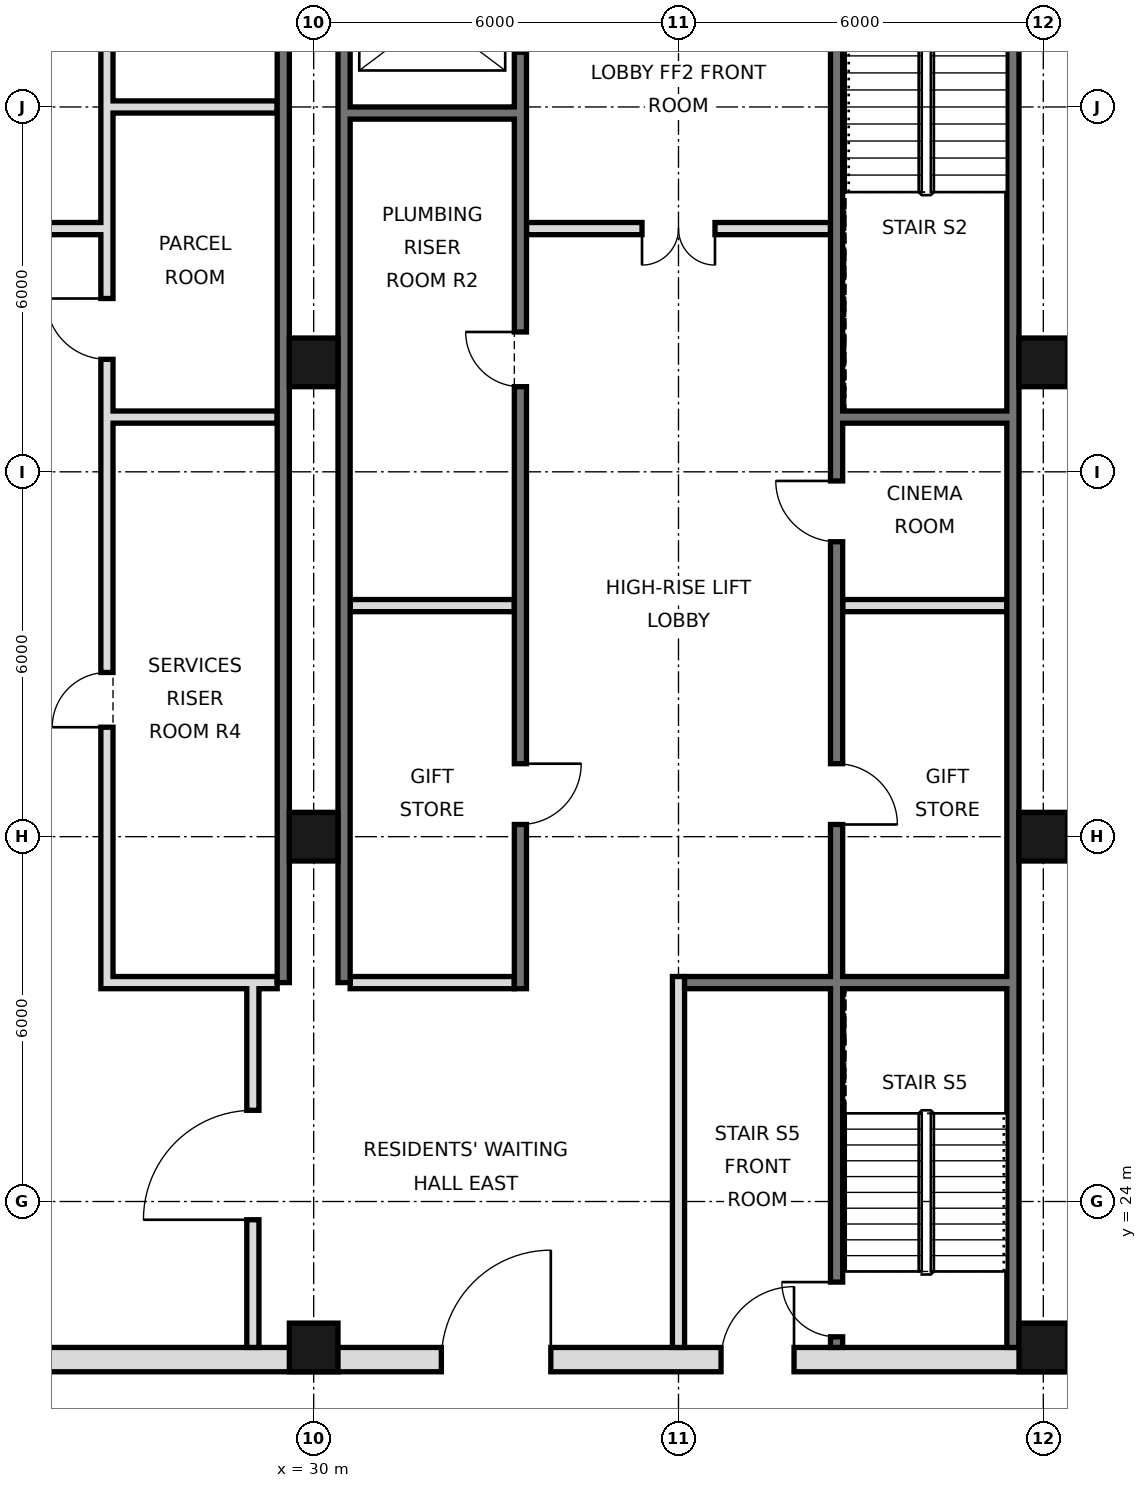
"""IFC4 building model, lengths in metres.
Left out: names, types, materials, properties, quantities, classifications, styles, units other than length and angle.
Written with IfcOpenShell. Run it as: python <this file> out.ifc"""

import sys

from ifc_helpers import new_model, si_unit, direction, frame, frame_2d, origin, origin_2d, place, context, subcontext, project, spatial, rectangle, hollow_rectangle, extrude, element, fill, save


model = new_model("IFC4")
c1 = context("Model", 3, precision=1e-05, world=origin(), true_north=direction((0.0, 1.0)))
c2 = subcontext(c1, "Body", "Model", "MODEL_VIEW")
j1 = project(units=[si_unit("LENGTHUNIT", "METRE"), si_unit("PLANEANGLEUNIT", "RADIAN")], contexts=[c1])
p1 = place(None, origin())
s1 = spatial("IfcSite", under=j1, at=p1, CompositionType="ELEMENT")
p2 = place(p1, origin())
s2 = spatial("IfcBuilding", under=s1, at=p2, CompositionType="ELEMENT")
p3 = place(p2, frame((0.0, 0.0, 96.2)))
s3 = spatial("IfcBuildingStorey", under=s2, at=p3, CompositionType="ELEMENT", Elevation=96.2)
for number, where, z_axis, x_axis in (
    (1, (30.0, 21.6, 0.0), (0.0, 0.0, 1.0), (1.0, 0.0, 0.0)),
    (2, (30.0, 30.0, 0.0), (0.0, 0.0, 1.0), (1.0, 0.0, 0.0)),
    (3, (30.0, 37.8, 0.0), (0.0, 0.0, 1.0), (1.0, 0.0, 0.0)),
    (4, (42.0, 21.6, 0.0), (0.0, 0.0, 1.0), (1.0, 0.0, 0.0)),
    (5, (42.0, 30.0, 0.0), (0.0, 0.0, 1.0), (1.0, 0.0, 0.0)),
    (6, (42.0, 37.8, 0.0), (0.0, 0.0, 1.0), (1.0, 0.0, 0.0)),
):
    element("IfcColumn", number, at=place(p3, frame(where, z_axis=z_axis, x_axis=x_axis)), inside=s3, PredefinedType="COLUMN", context=c2, shape_type="SweptSolid", body=[
        extrude(hollow_rectangle(XDim=0.8, YDim=0.8, WallThickness=0.05, at=origin_2d()), origin(), (0.0, 0.0, 1.0), 3.6),
    ])
p4 = place(p3, frame((41.5, 21.6, 0.0), z_axis=(0.0, 0.0, 1.0), x_axis=(0.0, 1.0, 0.0)))
e7 = element("IfcWall", 7, at=p4, inside=s3, PredefinedType="SOLIDWALL", context=c2, shape_type="SweptSolid", body=[
    extrude(rectangle(XDim=23.5, YDim=0.2, at=frame_2d((11.75, 0.0))), origin(), (0.0, 0.0, 1.0), 3.42),
])
for number, where, z_axis, x_axis in (
    (8, (29.5, 27.6, 0.0), (0.0, 0.0, 1.0), (0.0, 1.0, 0.0)),
    (9, (30.5, 27.6, 0.0), (0.0, 0.0, 1.0), (0.0, 1.0, 0.0)),
):
    element("IfcWall", number, at=place(p3, frame(where, z_axis=z_axis, x_axis=x_axis)), inside=s3, PredefinedType="SOLIDWALL", context=c2, shape_type="SweptSolid", body=[
        extrude(rectangle(XDim=17.5, YDim=0.2, at=frame_2d((8.75, 0.0))), origin(), (0.0, 0.0, 1.0), 3.42),
    ])
p5 = place(p3, frame((5.6, 21.4, 0.0), z_axis=(0.0, 0.0, 1.0), x_axis=(1.0, 0.0, 0.0)))
e10 = element("IfcWall", 10, at=p5, inside=s3, PredefinedType="SOLIDWALL", context=c2, shape_type="SweptSolid", body=[
    extrude(rectangle(XDim=36.8, YDim=0.4, at=frame_2d((18.4, 0.0))), origin(), (0.0, 0.0, 1.0), 3.42),
])
p6 = place(p5, frame((8.5, 0.0, 0.0)))
e11 = element("IfcOpeningElement", 11, at=p6, cuts=e10, PredefinedType="OPENING", context=c2, shape_type="SweptSolid", body=[
    extrude(rectangle(XDim=1.8, YDim=2.1, at=frame_2d((0.9, 1.05))), frame((0.0, 0.21, 0.0), z_axis=(0.0, -1.0, 0.0), x_axis=(1.0, 0.0, 0.0)), (0.0, 0.0, 1.0), 0.42),
])
p7 = place(p5, frame((17.5, 0.0, 0.0)))
e12 = element("IfcOpeningElement", 12, at=p7, cuts=e10, PredefinedType="OPENING", context=c2, shape_type="SweptSolid", body=[
    extrude(rectangle(XDim=1.8, YDim=2.1, at=frame_2d((0.9, 1.05))), frame((0.0, 0.21, 0.0), z_axis=(0.0, -1.0, 0.0), x_axis=(1.0, 0.0, 0.0)), (0.0, 0.0, 1.0), 0.42),
])
p8 = place(p5, frame((26.5, 0.0, 0.0)))
e13 = element("IfcOpeningElement", 13, at=p8, cuts=e10, PredefinedType="OPENING", context=c2, shape_type="SweptSolid", body=[
    extrude(rectangle(XDim=1.8, YDim=2.1, at=frame_2d((0.9, 1.05))), frame((0.0, 0.21, 0.0), z_axis=(0.0, -1.0, 0.0), x_axis=(1.0, 0.0, 0.0)), (0.0, 0.0, 1.0), 0.42),
])
p9 = place(p5, frame((4.5, 0.0, 0.0)))
e14 = element("IfcOpeningElement", 14, at=p9, cuts=e10, PredefinedType="OPENING", context=c2, shape_type="SweptSolid", body=[
    extrude(rectangle(XDim=1.2, YDim=2.1, at=frame_2d((0.6, 1.05))), frame((0.0, 0.21, 0.0), z_axis=(0.0, -1.0, 0.0), x_axis=(1.0, 0.0, 0.0)), (0.0, 0.0, 1.0), 0.42),
])
p10 = place(p5, frame((31.1, 0.0, 0.0)))
e15 = element("IfcOpeningElement", 15, at=p10, cuts=e10, PredefinedType="OPENING", context=c2, shape_type="SweptSolid", body=[
    extrude(rectangle(XDim=1.2, YDim=2.1, at=frame_2d((0.6, 1.05))), frame((0.0, 0.21, 0.0), z_axis=(0.0, -1.0, 0.0), x_axis=(1.0, 0.0, 0.0)), (0.0, 0.0, 1.0), 0.42),
])
p11 = place(p3, frame((29.0, 21.6, 0.0), z_axis=(0.0, 0.0, 1.0), x_axis=(0.0, 1.0, 0.0)))
e16 = element("IfcWall", 16, at=p11, inside=s3, PredefinedType="PARTITIONING", context=c2, shape_type="SweptSolid", body=[
    extrude(rectangle(XDim=6.0, YDim=0.2, at=frame_2d((3.0, 0.0))), origin(), (0.0, 0.0, 1.0), 3.42),
])
p12 = place(p11, frame((2.1, 0.0, 0.0)))
e17 = element("IfcOpeningElement", 17, at=p12, cuts=e16, PredefinedType="OPENING", context=c2, shape_type="SweptSolid", body=[
    extrude(rectangle(XDim=1.8, YDim=2.1, at=frame_2d((0.9, 1.05))), frame((0.0, 0.11, 0.0), z_axis=(0.0, -1.0, 0.0), x_axis=(1.0, 0.0, 0.0)), (0.0, 0.0, 1.0), 0.22),
])
p13 = place(p3, frame((26.6, 27.5, 0.0), z_axis=(0.0, 0.0, 1.0), x_axis=(0.0, 1.0, 0.0)))
e18 = element("IfcWall", 18, at=p13, inside=s3, PredefinedType="SOLIDWALL", context=c2, shape_type="SweptSolid", body=[
    extrude(rectangle(XDim=17.5, YDim=0.2, at=frame_2d((8.75, 0.0))), origin(), (0.0, 0.0, 1.0), 3.42),
])
p14 = place(p13, frame((4.3, 0.0, 0.0)))
e19 = element("IfcOpeningElement", 19, at=p14, cuts=e18, PredefinedType="OPENING", context=c2, shape_type="SweptSolid", body=[
    extrude(rectangle(XDim=0.9, YDim=2.1, at=frame_2d((0.45, 1.05))), frame((0.0, 0.11, 0.0), z_axis=(0.0, -1.0, 0.0), x_axis=(1.0, 0.0, 0.0)), (0.0, 0.0, 1.0), 0.22),
])
p15 = place(p13, frame((10.35, 0.0, 0.0)))
e20 = element("IfcOpeningElement", 20, at=p15, cuts=e18, PredefinedType="OPENING", context=c2, shape_type="SweptSolid", body=[
    extrude(rectangle(XDim=1.0, YDim=2.1, at=frame_2d((0.5, 1.05))), frame((0.0, 0.11, 0.0), z_axis=(0.0, -1.0, 0.0), x_axis=(1.0, 0.0, 0.0)), (0.0, 0.0, 1.0), 0.22),
])
p16 = place(p13, frame((15.475, 0.0, 0.0)))
e21 = element("IfcOpeningElement", 21, at=p16, cuts=e18, PredefinedType="OPENING", context=c2, shape_type="SweptSolid", body=[
    extrude(rectangle(XDim=1.0, YDim=2.1, at=frame_2d((0.5, 1.05))), frame((0.0, 0.11, 0.0), z_axis=(0.0, -1.0, 0.0), x_axis=(1.0, 0.0, 0.0)), (0.0, 0.0, 1.0), 0.22),
])
p17 = place(p3, frame((33.4, 27.5, 0.0), z_axis=(0.0, 0.0, 1.0), x_axis=(0.0, 1.0, 0.0)))
e22 = element("IfcWall", 22, at=p17, inside=s3, PredefinedType="SOLIDWALL", context=c2, shape_type="SweptSolid", body=[
    extrude(rectangle(XDim=17.5, YDim=0.2, at=frame_2d((8.75, 0.0))), origin(), (0.0, 0.0, 1.0), 3.42),
])
p18 = place(p17, frame((15.4, 0.0, 0.0)))
e23 = element("IfcOpeningElement", 23, at=p18, cuts=e22, PredefinedType="OPENING", context=c2, shape_type="SweptSolid", body=[
    extrude(rectangle(XDim=1.1, YDim=2.1, at=frame_2d((0.55, 1.05))), frame((0.0, 0.11, 0.0), z_axis=(0.0, -1.0, 0.0), x_axis=(1.0, 0.0, 0.0)), (0.0, 0.0, 1.0), 0.22),
])
p19 = place(p17, frame((2.7, 0.0, 0.0)))
e24 = element("IfcOpeningElement", 24, at=p19, cuts=e22, PredefinedType="OPENING", context=c2, shape_type="SweptSolid", body=[
    extrude(rectangle(XDim=1.0, YDim=2.1, at=frame_2d((0.5, 1.05))), frame((0.0, 0.11, 0.0), z_axis=(0.0, -1.0, 0.0), x_axis=(1.0, 0.0, 0.0)), (0.0, 0.0, 1.0), 0.22),
])
p20 = place(p17, frame((9.9, 0.0, 0.0)))
e25 = element("IfcOpeningElement", 25, at=p20, cuts=e22, PredefinedType="OPENING", context=c2, shape_type="SweptSolid", body=[
    extrude(rectangle(XDim=0.9, YDim=2.1, at=frame_2d((0.45, 1.05))), frame((0.0, 0.11, 0.0), z_axis=(0.0, -1.0, 0.0), x_axis=(1.0, 0.0, 0.0)), (0.0, 0.0, 1.0), 0.22),
])
p21 = place(p3, frame((36.0, 21.6, 0.0), z_axis=(0.0, 0.0, 1.0), x_axis=(0.0, 1.0, 0.0)))
e26 = element("IfcWall", 26, at=p21, inside=s3, PredefinedType="PARTITIONING", context=c2, shape_type="SweptSolid", body=[
    extrude(rectangle(XDim=6.1, YDim=0.2, at=frame_2d((3.05, 0.0))), origin(), (0.0, 0.0, 1.0), 3.42),
])
p22 = place(p3, frame((38.6, 21.6, 0.0), z_axis=(0.0, 0.0, 1.0), x_axis=(0.0, 1.0, 0.0)))
e27 = element("IfcWall", 27, at=p22, inside=s3, PredefinedType="SOLIDWALL", context=c2, shape_type="SweptSolid", body=[
    extrude(rectangle(XDim=23.4, YDim=0.2, at=frame_2d((11.7, 0.0))), origin(), (0.0, 0.0, 1.0), 3.42),
])
p23 = place(p22, frame((8.6, 0.0, 0.0)))
e28 = element("IfcOpeningElement", 28, at=p23, cuts=e27, PredefinedType="OPENING", context=c2, shape_type="SweptSolid", body=[
    extrude(rectangle(XDim=1.0, YDim=2.1, at=frame_2d((0.5, 1.05))), frame((0.0, 0.11, 0.0), z_axis=(0.0, -1.0, 0.0), x_axis=(1.0, 0.0, 0.0)), (0.0, 0.0, 1.0), 0.22),
])
p24 = place(p22, frame((13.25, 0.0, 0.0)))
e29 = element("IfcOpeningElement", 29, at=p24, cuts=e27, PredefinedType="OPENING", context=c2, shape_type="SweptSolid", body=[
    extrude(rectangle(XDim=1.0, YDim=2.1, at=frame_2d((0.5, 1.05))), frame((0.0, 0.11, 0.0), z_axis=(0.0, -1.0, 0.0), x_axis=(1.0, 0.0, 0.0)), (0.0, 0.0, 1.0), 0.22),
])
p25 = place(p22, frame((22.1, 0.0, 0.0)))
e30 = element("IfcOpeningElement", 30, at=p25, cuts=e27, PredefinedType="OPENING", context=c2, shape_type="SweptSolid", body=[
    extrude(rectangle(XDim=1.0, YDim=2.1, at=frame_2d((0.5, 1.05))), frame((0.0, 0.11, 0.0), z_axis=(0.0, -1.0, 0.0), x_axis=(1.0, 0.0, 0.0)), (0.0, 0.0, 1.0), 0.22),
])
p26 = place(p22, frame((0.175, 0.0, 0.0)))
e31 = element("IfcOpeningElement", 31, at=p26, cuts=e27, PredefinedType="OPENING", context=c2, shape_type="SweptSolid", body=[
    extrude(rectangle(XDim=0.9, YDim=2.1, at=frame_2d((0.45, 1.05))), frame((0.0, 0.11, 0.0), z_axis=(0.0, -1.0, 0.0), x_axis=(1.0, 0.0, 0.0)), (0.0, 0.0, 1.0), 0.22),
])
p27 = place(p3, frame((26.7, 27.6, 0.0), z_axis=(0.0, 0.0, 1.0), x_axis=(1.0, 0.0, 0.0)))
e32 = element("IfcWall", 32, at=p27, inside=s3, PredefinedType="SOLIDWALL", context=c2, shape_type="SweptSolid", body=[
    extrude(rectangle(XDim=2.7, YDim=0.2, at=frame_2d((1.35, 0.0))), origin(), (0.0, 0.0, 1.0), 3.42),
])
p28 = place(p3, frame((30.6, 27.6, 0.0), z_axis=(0.0, 0.0, 1.0), x_axis=(1.0, 0.0, 0.0)))
e33 = element("IfcWall", 33, at=p28, inside=s3, PredefinedType="PARTITIONING", context=c2, shape_type="SweptSolid", body=[
    extrude(rectangle(XDim=2.7, YDim=0.2, at=frame_2d((1.35, 0.0))), origin(), (0.0, 0.0, 1.0), 3.42),
])
p29 = place(p3, frame((36.1, 27.6, 0.0), z_axis=(0.0, 0.0, 1.0), x_axis=(1.0, 0.0, 0.0)))
e34 = element("IfcWall", 34, at=p29, inside=s3, PredefinedType="SOLIDWALL", context=c2, shape_type="SweptSolid", body=[
    extrude(rectangle(XDim=5.3, YDim=0.2, at=frame_2d((2.65, 0.0))), origin(), (0.0, 0.0, 1.0), 3.42),
])
p30 = place(p3, frame((30.6, 33.8, 0.0), z_axis=(0.0, 0.0, 1.0), x_axis=(1.0, 0.0, 0.0)))
e35 = element("IfcWall", 35, at=p30, inside=s3, PredefinedType="SOLIDWALL", context=c2, shape_type="SweptSolid", body=[
    extrude(rectangle(XDim=2.7, YDim=0.2, at=frame_2d((1.35, 0.0))), origin(), (0.0, 0.0, 1.0), 3.42),
])
p31 = place(p3, frame((38.7, 33.8, 0.0), z_axis=(0.0, 0.0, 1.0), x_axis=(1.0, 0.0, 0.0)))
e36 = element("IfcWall", 36, at=p31, inside=s3, PredefinedType="PARTITIONING", context=c2, shape_type="SweptSolid", body=[
    extrude(rectangle(XDim=2.7, YDim=0.2, at=frame_2d((1.35, 0.0))), origin(), (0.0, 0.0, 1.0), 3.42),
])
for number, where, z_axis, x_axis in (
    (37, (26.7, 36.9, 0.0), (0.0, 0.0, 1.0), (1.0, 0.0, 0.0)),
    (38, (38.7, 36.9, 0.0), (0.0, 0.0, 1.0), (1.0, 0.0, 0.0)),
):
    element("IfcWall", number, at=place(p3, frame(where, z_axis=z_axis, x_axis=x_axis)), inside=s3, PredefinedType="SOLIDWALL", context=c2, shape_type="SweptSolid", body=[
        extrude(rectangle(XDim=2.7, YDim=0.2, at=frame_2d((1.35, 0.0))), origin(), (0.0, 0.0, 1.0), 3.42),
    ])
p32 = place(p3, frame((21.5, 40.0, 0.0), z_axis=(0.0, 0.0, 1.0), x_axis=(1.0, 0.0, 0.0)))
e39 = element("IfcWall", 39, at=p32, inside=s3, PredefinedType="PARTITIONING", context=c2, shape_type="SweptSolid", body=[
    extrude(rectangle(XDim=5.0, YDim=0.2, at=frame_2d((2.5, 0.0))), origin(), (0.0, 0.0, 1.0), 3.42),
])
p33 = place(p32, frame((1.9, 0.0, 0.0)))
e40 = element("IfcOpeningElement", 40, at=p33, cuts=e39, PredefinedType="OPENING", context=c2, shape_type="SweptSolid", body=[
    extrude(rectangle(XDim=1.2, YDim=2.1, at=frame_2d((0.6, 1.05))), frame((0.0, 0.11, 0.0), z_axis=(0.0, -1.0, 0.0), x_axis=(1.0, 0.0, 0.0)), (0.0, 0.0, 1.0), 0.22),
])
p34 = place(p3, frame((33.5, 40.0, 0.0), z_axis=(0.0, 0.0, 1.0), x_axis=(1.0, 0.0, 0.0)))
e41 = element("IfcWall", 41, at=p34, inside=s3, PredefinedType="PARTITIONING", context=c2, shape_type="SweptSolid", body=[
    extrude(rectangle(XDim=5.0, YDim=0.2, at=frame_2d((2.5, 0.0))), origin(), (0.0, 0.0, 1.0), 3.42),
])
p35 = place(p34, frame((1.9, 0.0, 0.0)))
e42 = element("IfcOpeningElement", 42, at=p35, cuts=e41, PredefinedType="OPENING", context=c2, shape_type="SweptSolid", body=[
    extrude(rectangle(XDim=1.2, YDim=2.1, at=frame_2d((0.6, 1.05))), frame((0.0, 0.11, 0.0), z_axis=(0.0, -1.0, 0.0), x_axis=(1.0, 0.0, 0.0)), (0.0, 0.0, 1.0), 0.22),
])
p36 = place(p3, frame((30.6, 41.9, 0.0), z_axis=(0.0, 0.0, 1.0), x_axis=(1.0, 0.0, 0.0)))
e43 = element("IfcWall", 43, at=p36, inside=s3, PredefinedType="SOLIDWALL", context=c2, shape_type="SweptSolid", body=[
    extrude(rectangle(XDim=2.7, YDim=0.2, at=frame_2d((1.35, 0.0))), origin(), (0.0, 0.0, 1.0), 3.42),
])
p37 = place(p3, frame((26.7, 42.0, 0.0), z_axis=(0.0, 0.0, 1.0), x_axis=(1.0, 0.0, 0.0)))
e44 = element("IfcWall", 44, at=p37, inside=s3, PredefinedType="PARTITIONING", context=c2, shape_type="SweptSolid", body=[
    extrude(rectangle(XDim=2.7, YDim=0.2, at=frame_2d((1.35, 0.0))), origin(), (0.0, 0.0, 1.0), 3.42),
])
p38 = place(p12, origin())
e45 = element("IfcDoor", 45, at=p38, inside=s3, OperationType="SINGLE_SWING_LEFT", PredefinedType="DOOR", context=c2, shape_type="SweptSolid", body=[
    extrude(rectangle(XDim=1.8, YDim=2.1, at=frame_2d((0.9, 1.05))), frame((0.0, 0.025, 0.0), z_axis=(0.0, -1.0, 0.0), x_axis=(1.0, 0.0, 0.0)), (0.0, 0.0, 1.0), 0.05),
])
fill(e17, e45)
p39 = place(p8, frame((1.8, 0.0, 0.0), z_axis=(0.0, 0.0, 1.0), x_axis=(-1.0, 0.0, 0.0)))
e46 = element("IfcDoor", 46, at=p39, inside=s3, OperationType="SINGLE_SWING_LEFT", PredefinedType="DOOR", context=c2, shape_type="SweptSolid", body=[
    extrude(rectangle(XDim=1.8, YDim=2.1, at=frame_2d((0.9, 1.05))), frame((0.0, 0.025, 0.0), z_axis=(0.0, -1.0, 0.0), x_axis=(1.0, 0.0, 0.0)), (0.0, 0.0, 1.0), 0.05),
])
fill(e13, e46)
p40 = place(p10, frame((1.2, 0.0, 0.0), z_axis=(0.0, 0.0, 1.0), x_axis=(-1.0, 0.0, 0.0)))
e47 = element("IfcDoor", 47, at=p40, inside=s3, OperationType="SINGLE_SWING_LEFT", PredefinedType="DOOR", context=c2, shape_type="SweptSolid", body=[
    extrude(rectangle(XDim=1.2, YDim=2.1, at=frame_2d((0.6, 1.05))), frame((0.0, 0.025, 0.0), z_axis=(0.0, -1.0, 0.0), x_axis=(1.0, 0.0, 0.0)), (0.0, 0.0, 1.0), 0.05),
])
fill(e15, e47)
p41 = place(p35, frame((1.2, 0.0, 0.0), z_axis=(0.0, 0.0, 1.0), x_axis=(-1.0, 0.0, 0.0)))
e48 = element("IfcDoor", 48, at=p41, inside=s3, OperationType="DOUBLE_DOOR_SINGLE_SWING", PredefinedType="DOOR", context=c2, shape_type="SweptSolid", body=[
    extrude(rectangle(XDim=1.2, YDim=2.1, at=frame_2d((0.6, 1.05))), frame((0.0, 0.025, 0.0), z_axis=(0.0, -1.0, 0.0), x_axis=(1.0, 0.0, 0.0)), (0.0, 0.0, 1.0), 0.05),
])
fill(e42, e48)
p42 = place(p23, frame((1.0, 0.0, 0.0), z_axis=(0.0, 0.0, 1.0), x_axis=(-1.0, 0.0, 0.0)))
e49 = element("IfcDoor", 49, at=p42, inside=s3, OperationType="SINGLE_SWING_RIGHT", PredefinedType="DOOR", context=c2, shape_type="SweptSolid", body=[
    extrude(rectangle(XDim=1.0, YDim=2.1, at=frame_2d((0.5, 1.05))), frame((0.0, 0.025, 0.0), z_axis=(0.0, -1.0, 0.0), x_axis=(1.0, 0.0, 0.0)), (0.0, 0.0, 1.0), 0.05),
])
fill(e28, e49)
p43 = place(p24, frame((1.0, 0.0, 0.0), z_axis=(0.0, 0.0, 1.0), x_axis=(-1.0, 0.0, 0.0)))
e50 = element("IfcDoor", 50, at=p43, inside=s3, OperationType="SINGLE_SWING_LEFT", PredefinedType="DOOR", context=c2, shape_type="SweptSolid", body=[
    extrude(rectangle(XDim=1.0, YDim=2.1, at=frame_2d((0.5, 1.05))), frame((0.0, 0.025, 0.0), z_axis=(0.0, -1.0, 0.0), x_axis=(1.0, 0.0, 0.0)), (0.0, 0.0, 1.0), 0.05),
])
fill(e29, e50)
p44 = place(p19, origin())
e51 = element("IfcDoor", 51, at=p44, inside=s3, OperationType="SINGLE_SWING_RIGHT", PredefinedType="DOOR", context=c2, shape_type="SweptSolid", body=[
    extrude(rectangle(XDim=1.0, YDim=2.1, at=frame_2d((0.5, 1.05))), frame((0.0, 0.025, 0.0), z_axis=(0.0, -1.0, 0.0), x_axis=(1.0, 0.0, 0.0)), (0.0, 0.0, 1.0), 0.05),
])
fill(e24, e51)
p45 = place(p26, frame((0.9, 0.0, 0.0), z_axis=(0.0, 0.0, 1.0), x_axis=(-1.0, 0.0, 0.0)))
e52 = element("IfcDoor", 52, at=p45, inside=s3, OperationType="SINGLE_SWING_LEFT", PredefinedType="DOOR", context=c2, shape_type="SweptSolid", body=[
    extrude(rectangle(XDim=0.9, YDim=2.1, at=frame_2d((0.45, 1.05))), frame((0.0, 0.025, 0.0), z_axis=(0.0, -1.0, 0.0), x_axis=(1.0, 0.0, 0.0)), (0.0, 0.0, 1.0), 0.05),
])
fill(e31, e52)
p46 = place(p20, frame((0.9, 0.0, 0.0), z_axis=(0.0, 0.0, 1.0), x_axis=(-1.0, 0.0, 0.0)))
e53 = element("IfcDoor", 53, at=p46, inside=s3, OperationType="SINGLE_SWING_LEFT", PredefinedType="DOOR", context=c2, shape_type="SweptSolid", body=[
    extrude(rectangle(XDim=0.9, YDim=2.1, at=frame_2d((0.45, 1.05))), frame((0.0, 0.025, 0.0), z_axis=(0.0, -1.0, 0.0), x_axis=(1.0, 0.0, 0.0)), (0.0, 0.0, 1.0), 0.05),
])
fill(e25, e53)
p47 = place(p14, origin())
e54 = element("IfcDoor", 54, at=p47, inside=s3, OperationType="SINGLE_SWING_LEFT", PredefinedType="DOOR", context=c2, shape_type="SweptSolid", body=[
    extrude(rectangle(XDim=0.9, YDim=2.1, at=frame_2d((0.45, 1.05))), frame((0.0, 0.025, 0.0), z_axis=(0.0, -1.0, 0.0), x_axis=(1.0, 0.0, 0.0)), (0.0, 0.0, 1.0), 0.05),
])
fill(e19, e54)
p48 = place(p15, frame((1.0, 0.0, 0.0), z_axis=(0.0, 0.0, 1.0), x_axis=(-1.0, 0.0, 0.0)))
e55 = element("IfcDoor", 55, at=p48, inside=s3, OperationType="SINGLE_SWING_LEFT", PredefinedType="DOOR", context=c2, shape_type="SweptSolid", body=[
    extrude(rectangle(XDim=1.0, YDim=2.1, at=frame_2d((0.5, 1.05))), frame((0.0, 0.025, 0.0), z_axis=(0.0, -1.0, 0.0), x_axis=(1.0, 0.0, 0.0)), (0.0, 0.0, 1.0), 0.05),
])
fill(e20, e55)
save(model, sys.argv[1])
